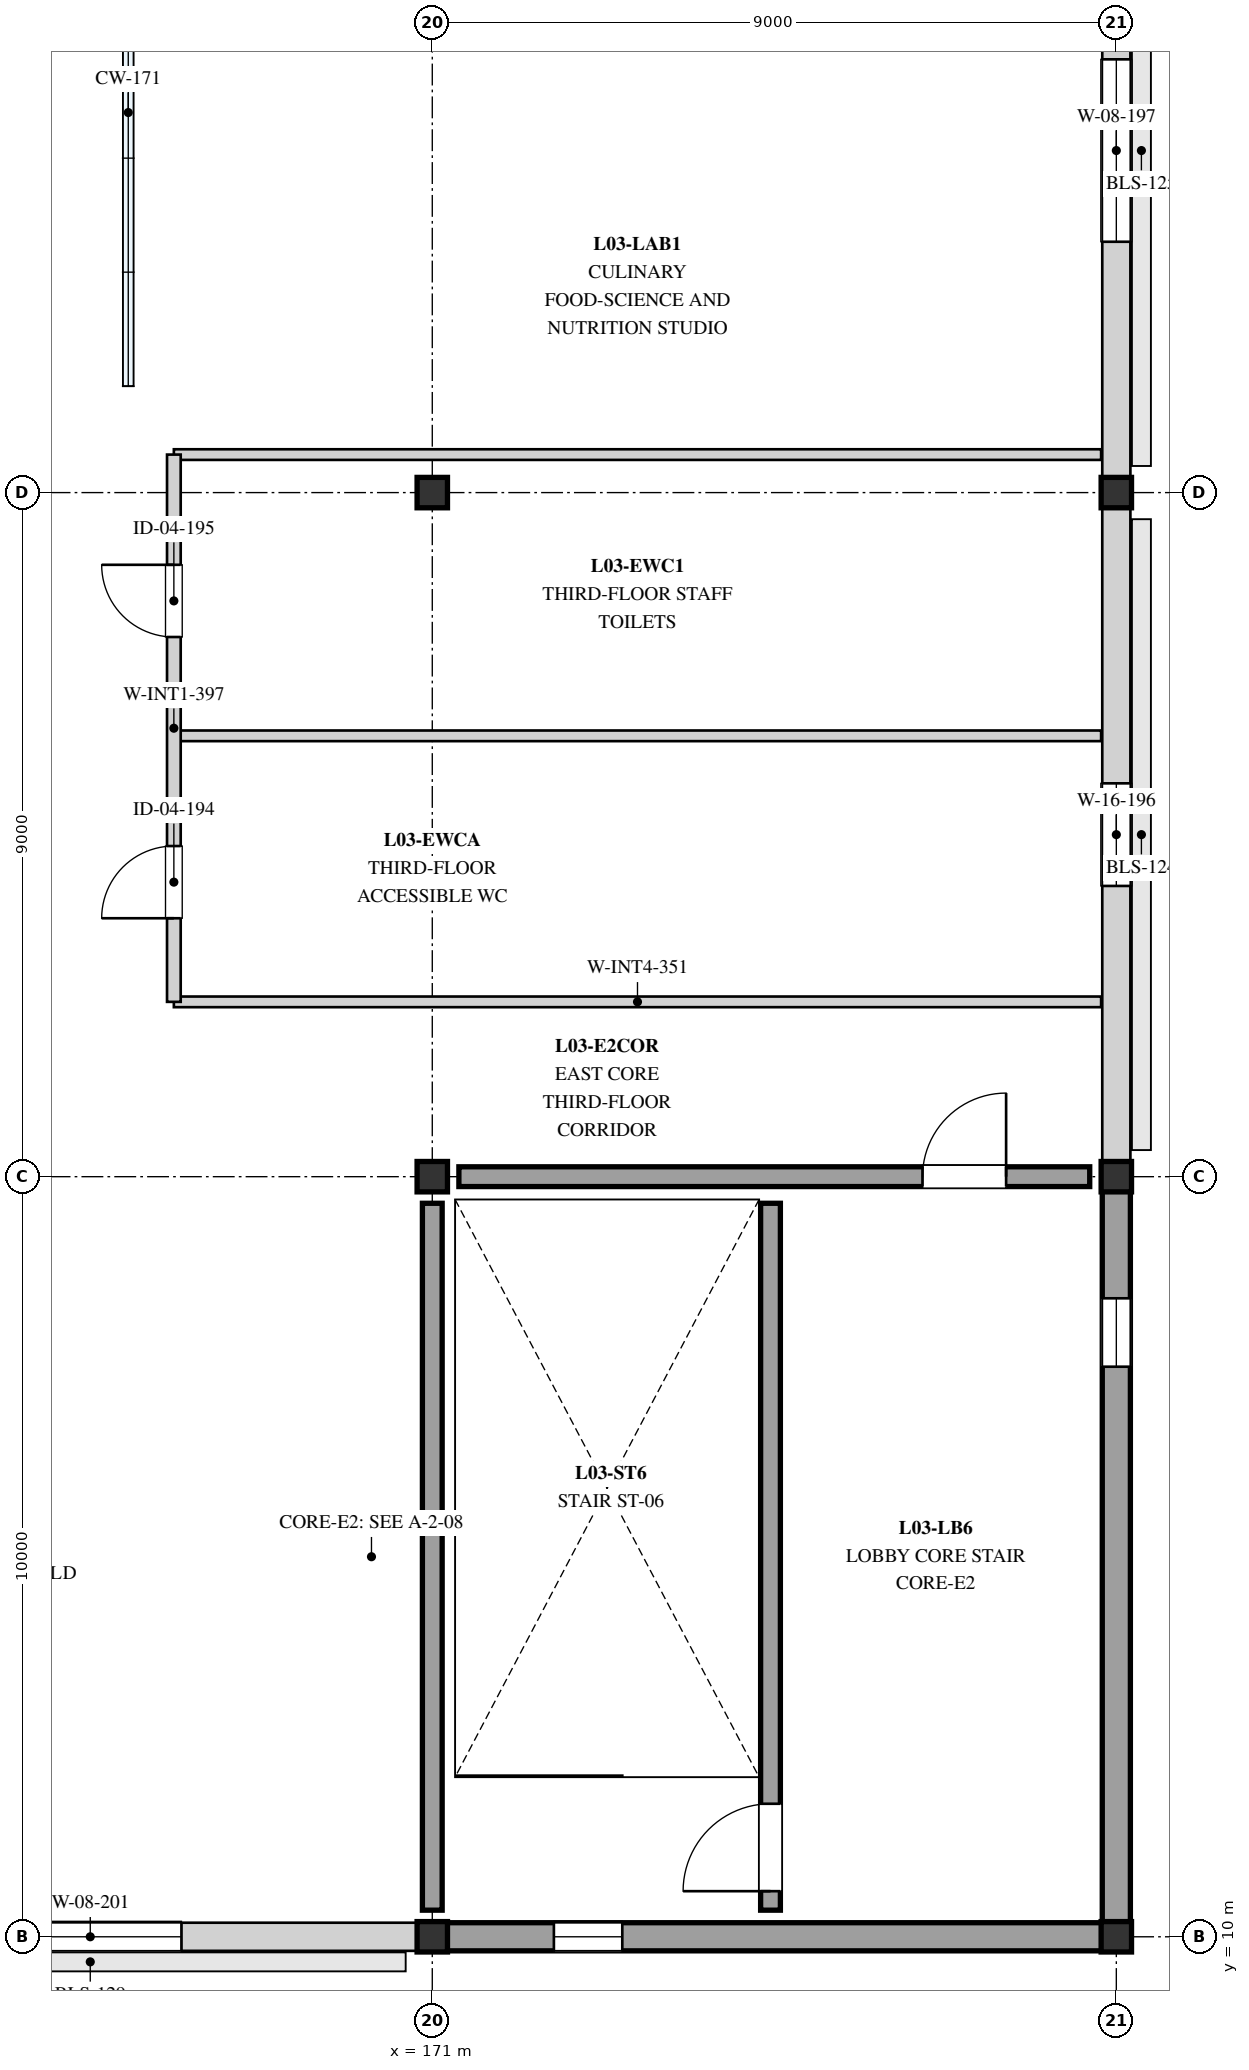
"""IFC4 building model, lengths in metres.
Left out: names, types, materials, properties, quantities, classifications, styles, units other than length and angle.
Written with IfcOpenShell. Run it as: python <this file> out.ifc"""

import sys

from ifc_helpers import new_model, si_unit, direction, frame, frame_2d, origin, origin_2d, place, context, subcontext, project, spatial, rectangle, extrude, element, fill, save


model = new_model("IFC4")
c1 = context("Model", 3, precision=1e-05, world=origin(), true_north=direction((0.0, 1.0)))
c2 = subcontext(c1, "Body", "Model", "MODEL_VIEW")
j1 = project(units=[si_unit("LENGTHUNIT", "METRE"), si_unit("PLANEANGLEUNIT", "RADIAN")], contexts=[c1])
p1 = place(None, origin())
s1 = spatial("IfcSite", under=j1, at=p1, CompositionType="ELEMENT")
p2 = place(p1, origin())
s2 = spatial("IfcBuilding", under=s1, at=p2, CompositionType="ELEMENT")
p3 = place(p2, frame((0.0, 0.0, 12.0)))
s3 = spatial("IfcBuildingStorey", under=s2, at=p3, CompositionType="ELEMENT", Elevation=12.0)
for number, where, z_axis, x_axis in (
    (1, (171.0, 10.0, 0.0), (0.0, 0.0, 1.0), (1.0, 0.0, 0.0)),
    (2, (171.0, 20.0, 0.0), (0.0, 0.0, 1.0), (1.0, 0.0, 0.0)),
    (3, (171.0, 29.0, 0.0), (0.0, 0.0, 1.0), (1.0, 0.0, 0.0)),
):
    element("IfcColumn", number, at=place(p3, frame(where, z_axis=z_axis, x_axis=x_axis)), inside=s3, PredefinedType="COLUMN", context=c2, shape_type="SweptSolid", body=[
        extrude(rectangle(XDim=0.4, YDim=0.4, at=origin_2d()), origin(), (0.0, 0.0, 1.0), 5.08),
    ])
for number, where, z_axis, x_axis in (
    (4, (180.0, 10.0, 0.0), (0.0, 0.0, 1.0), (1.0, 0.0, 0.0)),
    (5, (180.0, 20.0, 0.0), (0.0, 0.0, 1.0), (1.0, 0.0, 0.0)),
    (6, (180.0, 29.0, 0.0), (0.0, 0.0, 1.0), (1.0, 0.0, 0.0)),
):
    element("IfcColumn", number, at=place(p3, frame(where, z_axis=z_axis, x_axis=x_axis)), inside=s3, PredefinedType="COLUMN", context=c2, shape_type="SweptSolid", body=[
        extrude(rectangle(XDim=0.4, YDim=0.4, at=origin_2d()), origin(), (0.0, 0.0, 1.0), 3.08),
    ])
p4 = place(p3, frame((180.0, 20.0, 0.0), z_axis=(0.0, 0.0, 1.0), x_axis=(0.0, -1.0, 0.0)))
e7 = element("IfcWall", 7, at=p4, inside=s3, PredefinedType="STANDARD", context=c2, shape_type="SweptSolid", body=[
    extrude(rectangle(XDim=10.0, YDim=0.37, at=frame_2d((5.0, 0.0))), origin(), (0.0, 0.0, 1.0), 3.28),
])
p5 = place(p4, frame((1.6, 0.0, 0.7)))
e8 = element("IfcOpeningElement", 8, at=p5, cuts=e7, PredefinedType="OPENING", context=c2, shape_type="SweptSolid", body=[
    extrude(rectangle(XDim=0.9, YDim=2.4, at=frame_2d((0.45, 1.2))), frame((0.0, 0.195, 0.0), z_axis=(0.0, -1.0, 0.0), x_axis=(1.0, 0.0, 0.0)), (0.0, 0.0, 1.0), 0.39),
])
p6 = place(p3, frame((180.0, 20.0, 0.0), z_axis=(0.0, 0.0, 1.0), x_axis=(0.0, 1.0, 0.0)))
e9 = element("IfcWall", 9, at=p6, inside=s3, PredefinedType="STANDARD", context=c2, shape_type="SweptSolid", body=[
    extrude(rectangle(XDim=9.0, YDim=0.37, at=frame_2d((4.5, 0.0))), origin(), (0.0, 0.0, 1.0), 3.28),
])
p7 = place(p6, frame((3.825, 0.0, 0.9)))
e10 = element("IfcOpeningElement", 10, at=p7, cuts=e9, PredefinedType="OPENING", context=c2, shape_type="SweptSolid", body=[
    extrude(rectangle(XDim=1.35, YDim=1.6, at=frame_2d((0.675, 0.8))), frame((0.0, 0.195, 0.0), z_axis=(0.0, -1.0, 0.0), x_axis=(1.0, 0.0, 0.0)), (0.0, 0.0, 1.0), 0.39),
])
p8 = place(p3, frame((180.0, 29.0, 0.0), z_axis=(0.0, 0.0, 1.0), x_axis=(0.0, 1.0, 0.0)))
e11 = element("IfcWall", 11, at=p8, inside=s3, PredefinedType="STANDARD", context=c2, shape_type="SweptSolid", body=[
    extrude(rectangle(XDim=9.0, YDim=0.37, at=frame_2d((4.5, 0.0))), origin(), (0.0, 0.0, 1.0), 3.28),
])
p9 = place(p8, frame((3.3, 0.0, 0.9)))
e12 = element("IfcOpeningElement", 12, at=p9, cuts=e11, PredefinedType="OPENING", context=c2, shape_type="SweptSolid", body=[
    extrude(rectangle(XDim=2.4, YDim=2.0, at=frame_2d((1.2, 1.0))), frame((0.0, 0.195, 0.0), z_axis=(0.0, -1.0, 0.0), x_axis=(1.0, 0.0, 0.0)), (0.0, 0.0, 1.0), 0.39),
])
p10 = place(p3, frame((162.0, 10.0, 0.0), z_axis=(0.0, 0.0, 1.0), x_axis=(1.0, 0.0, 0.0)))
e13 = element("IfcWall", 13, at=p10, inside=s3, PredefinedType="STANDARD", context=c2, shape_type="SweptSolid", body=[
    extrude(rectangle(XDim=9.0, YDim=0.37, at=frame_2d((4.5, 0.0))), origin(), (0.0, 0.0, 1.0), 3.28),
])
p11 = place(p10, frame((3.3, 0.0, 0.9)))
e14 = element("IfcOpeningElement", 14, at=p11, cuts=e13, PredefinedType="OPENING", context=c2, shape_type="SweptSolid", body=[
    extrude(rectangle(XDim=2.4, YDim=2.0, at=frame_2d((1.2, 1.0))), frame((0.0, 0.195, 0.0), z_axis=(0.0, -1.0, 0.0), x_axis=(1.0, 0.0, 0.0)), (0.0, 0.0, 1.0), 0.39),
])
p12 = place(p3, frame((171.0, 10.0, 0.0), z_axis=(0.0, 0.0, 1.0), x_axis=(1.0, 0.0, 0.0)))
e15 = element("IfcWall", 15, at=p12, inside=s3, PredefinedType="STANDARD", context=c2, shape_type="SweptSolid", body=[
    extrude(rectangle(XDim=9.0, YDim=0.37, at=frame_2d((4.5, 0.0))), origin(), (0.0, 0.0, 1.0), 3.28),
])
p13 = place(p12, frame((1.6, 0.0, 0.7)))
e16 = element("IfcOpeningElement", 16, at=p13, cuts=e15, PredefinedType="OPENING", context=c2, shape_type="SweptSolid", body=[
    extrude(rectangle(XDim=0.9, YDim=2.4, at=frame_2d((0.45, 1.2))), frame((0.0, 0.195, 0.0), z_axis=(0.0, -1.0, 0.0), x_axis=(1.0, 0.0, 0.0)), (0.0, 0.0, 1.0), 0.39),
])
p14 = place(p3, frame((175.45, 10.35, 0.0), z_axis=(0.0, 0.0, 1.0), x_axis=(0.0, 1.0, 0.0)))
e17 = element("IfcWall", 17, at=p14, inside=s3, PredefinedType="SHEAR", context=c2, shape_type="SweptSolid", body=[
    extrude(rectangle(XDim=9.3, YDim=0.26, at=frame_2d((4.65, 0.0))), origin(), (0.0, 0.0, 1.0), 4.37),
])
p15 = place(p14, frame((0.25, 0.0, 0.0)))
e18 = element("IfcOpeningElement", 18, at=p15, cuts=e17, PredefinedType="OPENING", context=c2, shape_type="SweptSolid", body=[
    extrude(rectangle(XDim=1.15, YDim=2.15, at=frame_2d((0.575, 1.075))), frame((0.0, 0.14, 0.0), z_axis=(0.0, -1.0, 0.0), x_axis=(1.0, 0.0, 0.0)), (0.0, 0.0, 1.0), 0.28),
])
p16 = place(p3, frame((171.0, 10.35, 0.0), z_axis=(0.0, 0.0, 1.0), x_axis=(0.0, 1.0, 0.0)))
e19 = element("IfcWall", 19, at=p16, inside=s3, PredefinedType="SHEAR", context=c2, shape_type="SweptSolid", body=[
    extrude(rectangle(XDim=9.3, YDim=0.26, at=frame_2d((4.65, 0.0))), origin(), (0.0, 0.0, 1.0), 4.37),
])
p17 = place(p3, frame((171.35, 20.0, 0.0), z_axis=(0.0, 0.0, 1.0), x_axis=(1.0, 0.0, 0.0)))
e20 = element("IfcWall", 20, at=p17, inside=s3, PredefinedType="SHEAR", context=c2, shape_type="SweptSolid", body=[
    extrude(rectangle(XDim=8.3, YDim=0.26, at=frame_2d((4.15, 0.0))), origin(), (0.0, 0.0, 1.0), 4.37),
])
p18 = place(p17, frame((6.1, 0.0, 0.0)))
e21 = element("IfcOpeningElement", 21, at=p18, cuts=e20, PredefinedType="OPENING", context=c2, shape_type="SweptSolid", body=[
    extrude(rectangle(XDim=1.1, YDim=2.1, at=frame_2d((0.55, 1.05))), frame((0.0, 0.14, 0.0), z_axis=(0.0, -1.0, 0.0), x_axis=(1.0, 0.0, 0.0)), (0.0, 0.0, 1.0), 0.28),
])
for number, where, z_axis, x_axis in (
    (22, (167.6, 22.3, 0.0), (0.0, 0.0, 1.0), (1.0, 0.0, 0.0)),
    (23, (167.6, 25.8, 0.0), (0.0, 0.0, 1.0), (1.0, 0.0, 0.0)),
    (24, (167.6, 29.5, 0.0), (0.0, 0.0, 1.0), (1.0, 0.0, 0.0)),
):
    element("IfcWall", number, at=place(p3, frame(where, z_axis=z_axis, x_axis=x_axis)), inside=s3, PredefinedType="PARTITIONING", context=c2, shape_type="SweptSolid", body=[
        extrude(rectangle(XDim=12.2, YDim=0.14, at=frame_2d((6.1, 0.0))), origin(), (0.0, 0.0, 1.0), 2.35),
    ])
p19 = place(p3, frame((167.6, 22.3, 0.0), z_axis=(0.0, 0.0, 1.0), x_axis=(0.0, 1.0, 0.0)))
e25 = element("IfcWall", 25, at=p19, inside=s3, PredefinedType="STANDARD", context=c2, shape_type="SweptSolid", body=[
    extrude(rectangle(XDim=7.2, YDim=0.18, at=frame_2d((3.6, 0.0))), origin(), (0.0, 0.0, 1.0), 2.35),
])
p20 = place(p19, frame((1.1, 0.0, 0.0)))
e26 = element("IfcOpeningElement", 26, at=p20, cuts=e25, PredefinedType="OPENING", context=c2, shape_type="SweptSolid", body=[
    extrude(rectangle(XDim=0.95, YDim=2.1, at=frame_2d((0.475, 1.05))), frame((0.0, 0.1, 0.0), z_axis=(0.0, -1.0, 0.0), x_axis=(1.0, 0.0, 0.0)), (0.0, 0.0, 1.0), 0.2),
])
p21 = place(p19, frame((4.8, 0.0, 0.0)))
e27 = element("IfcOpeningElement", 27, at=p21, cuts=e25, PredefinedType="OPENING", context=c2, shape_type="SweptSolid", body=[
    extrude(rectangle(XDim=0.95, YDim=2.1, at=frame_2d((0.475, 1.05))), frame((0.0, 0.1, 0.0), z_axis=(0.0, -1.0, 0.0), x_axis=(1.0, 0.0, 0.0)), (0.0, 0.0, 1.0), 0.2),
])
p22 = place(p5, origin())
e28 = element("IfcWindow", 28, at=p22, inside=s3, PartitioningType="SINGLE_PANEL", PredefinedType="WINDOW", context=c2, shape_type="SweptSolid", body=[
    extrude(rectangle(XDim=0.9, YDim=2.4, at=frame_2d((0.45, 1.2))), frame((0.0, 0.03, 0.0), z_axis=(0.0, -1.0, 0.0), x_axis=(1.0, 0.0, 0.0)), (0.0, 0.0, 1.0), 0.06),
])
fill(e8, e28)
p23 = place(p7, origin())
e29 = element("IfcWindow", 29, at=p23, inside=s3, PartitioningType="SINGLE_PANEL", PredefinedType="WINDOW", context=c2, shape_type="SweptSolid", body=[
    extrude(rectangle(XDim=1.35, YDim=1.6, at=frame_2d((0.675, 0.8))), frame((0.0, 0.03, 0.0), z_axis=(0.0, -1.0, 0.0), x_axis=(1.0, 0.0, 0.0)), (0.0, 0.0, 1.0), 0.06),
])
fill(e10, e29)
p24 = place(p9, origin())
e30 = element("IfcWindow", 30, at=p24, inside=s3, PartitioningType="SINGLE_PANEL", PredefinedType="WINDOW", context=c2, shape_type="SweptSolid", body=[
    extrude(rectangle(XDim=2.4, YDim=2.0, at=frame_2d((1.2, 1.0))), frame((0.0, 0.03, 0.0), z_axis=(0.0, -1.0, 0.0), x_axis=(1.0, 0.0, 0.0)), (0.0, 0.0, 1.0), 0.06),
])
fill(e12, e30)
p25 = place(p11, origin())
e31 = element("IfcWindow", 31, at=p25, inside=s3, PartitioningType="SINGLE_PANEL", PredefinedType="WINDOW", context=c2, shape_type="SweptSolid", body=[
    extrude(rectangle(XDim=2.4, YDim=2.0, at=frame_2d((1.2, 1.0))), frame((0.0, 0.03, 0.0), z_axis=(0.0, -1.0, 0.0), x_axis=(1.0, 0.0, 0.0)), (0.0, 0.0, 1.0), 0.06),
])
fill(e14, e31)
p26 = place(p13, origin())
e32 = element("IfcWindow", 32, at=p26, inside=s3, PartitioningType="SINGLE_PANEL", PredefinedType="WINDOW", context=c2, shape_type="SweptSolid", body=[
    extrude(rectangle(XDim=0.9, YDim=2.4, at=frame_2d((0.45, 1.2))), frame((0.0, 0.03, 0.0), z_axis=(0.0, -1.0, 0.0), x_axis=(1.0, 0.0, 0.0)), (0.0, 0.0, 1.0), 0.06),
])
fill(e16, e32)
p27 = place(p15, origin())
e33 = element("IfcDoor", 33, at=p27, inside=s3, OperationType="SINGLE_SWING_LEFT", PredefinedType="DOOR", context=c2, shape_type="SweptSolid", body=[
    extrude(rectangle(XDim=1.15, YDim=2.15, at=frame_2d((0.575, 1.075))), frame((0.0, 0.025, 0.0), z_axis=(0.0, -1.0, 0.0), x_axis=(1.0, 0.0, 0.0)), (0.0, 0.0, 1.0), 0.05),
])
fill(e18, e33)
p28 = place(p18, origin())
e34 = element("IfcDoor", 34, at=p28, inside=s3, OperationType="SINGLE_SWING_RIGHT", PredefinedType="DOOR", context=c2, shape_type="SweptSolid", body=[
    extrude(rectangle(XDim=1.1, YDim=2.1, at=frame_2d((0.55, 1.05))), frame((0.0, 0.025, 0.0), z_axis=(0.0, -1.0, 0.0), x_axis=(1.0, 0.0, 0.0)), (0.0, 0.0, 1.0), 0.05),
])
fill(e21, e34)
p29 = place(p20, origin())
e35 = element("IfcDoor", 35, at=p29, inside=s3, OperationType="SINGLE_SWING_LEFT", PredefinedType="DOOR", context=c2, shape_type="SweptSolid", body=[
    extrude(rectangle(XDim=0.95, YDim=2.1, at=frame_2d((0.475, 1.05))), frame((0.0, 0.025, 0.0), z_axis=(0.0, -1.0, 0.0), x_axis=(1.0, 0.0, 0.0)), (0.0, 0.0, 1.0), 0.05),
])
fill(e26, e35)
p30 = place(p21, origin())
e36 = element("IfcDoor", 36, at=p30, inside=s3, OperationType="SINGLE_SWING_RIGHT", PredefinedType="DOOR", context=c2, shape_type="SweptSolid", body=[
    extrude(rectangle(XDim=0.95, YDim=2.1, at=frame_2d((0.475, 1.05))), frame((0.0, 0.025, 0.0), z_axis=(0.0, -1.0, 0.0), x_axis=(1.0, 0.0, 0.0)), (0.0, 0.0, 1.0), 0.05),
])
fill(e27, e36)
save(model, sys.argv[1])
